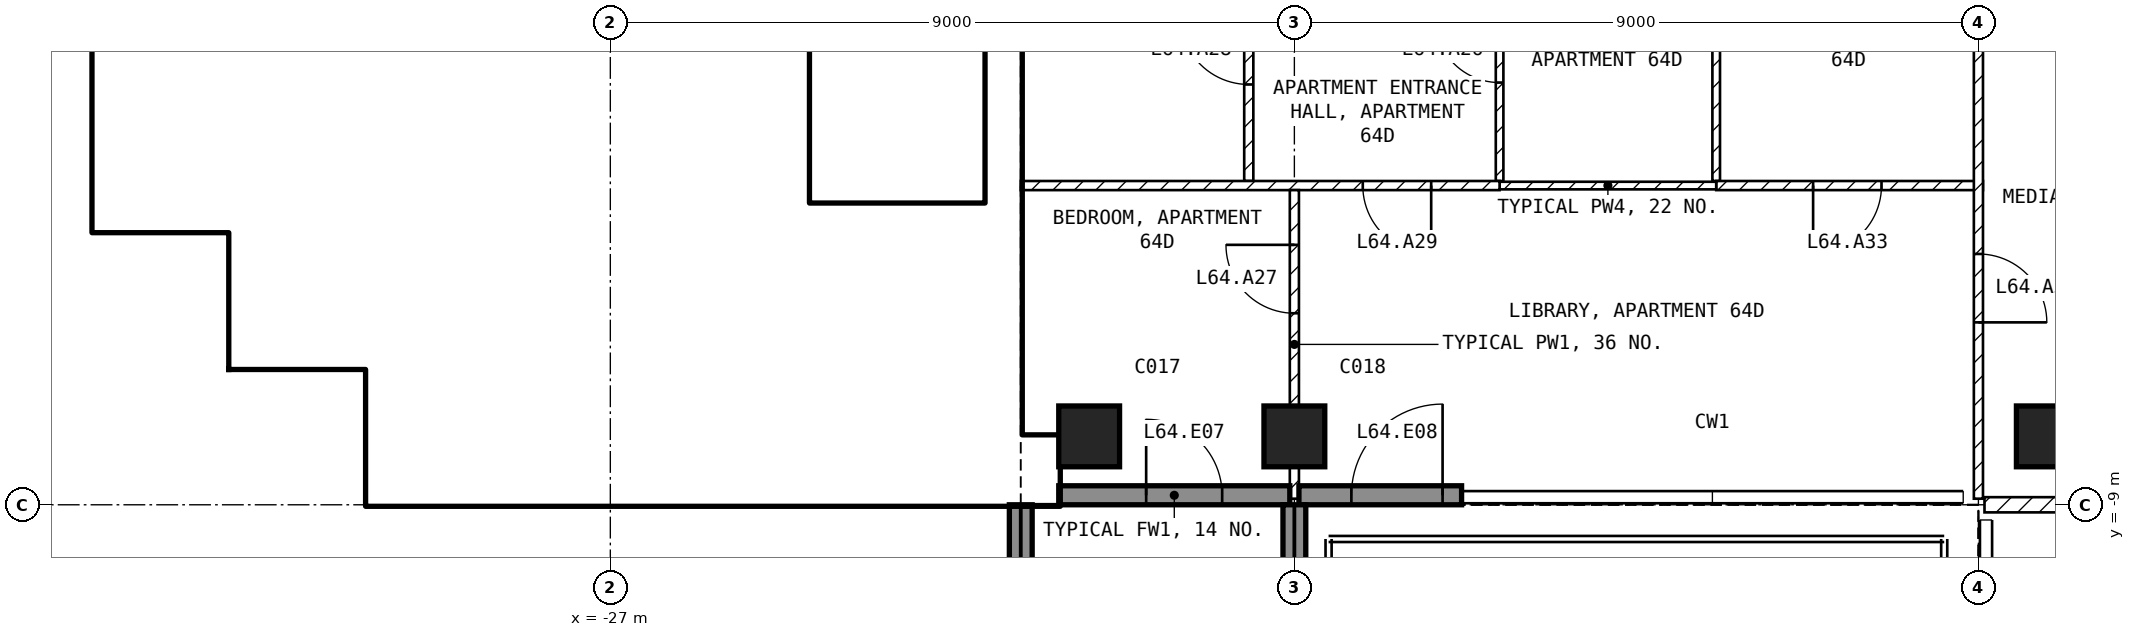
"""IFC4 building model, lengths in metres.
Left out: names, types, materials, properties, quantities, classifications, styles, units other than length and angle.
Written with IfcOpenShell. Run it as: python <this file> out.ifc"""

import sys

from ifc_helpers import new_model, si_unit, direction, frame, frame_2d, origin, origin_2d, place, context, subcontext, project, spatial, rectangle, extrude, element, fill, save


model = new_model("IFC4")
c1 = context("Model", 3, precision=1e-05, world=origin(), true_north=direction((0.0, 1.0)))
c2 = subcontext(c1, "Body", "Model", "MODEL_VIEW")
j1 = project(units=[si_unit("LENGTHUNIT", "METRE"), si_unit("PLANEANGLEUNIT", "RADIAN")], contexts=[c1])
p1 = place(None, origin())
s1 = spatial("IfcSite", under=j1, at=p1, CompositionType="ELEMENT")
p2 = place(p1, origin())
s2 = spatial("IfcBuilding", under=s1, at=p2, CompositionType="ELEMENT")
p3 = place(p2, frame((0.0, 0.0, 253.5)))
s3 = spatial("IfcBuildingStorey", under=s2, at=p3, CompositionType="ELEMENT", Elevation=253.5)
for number, where, z_axis, x_axis in (
    (1, (-20.7, -8.1, -0.25), (0.0, 0.0, 1.0), (1.0, 0.0, 0.0)),
    (2, (-18.0, -8.1, -0.25), (0.0, 0.0, 1.0), (1.0, 0.0, 0.0)),
    (3, (-8.1, -8.1, -0.25), (0.0, 0.0, 1.0), (1.0, 0.0, 0.0)),
):
    element("IfcColumn", number, at=place(p3, frame(where, z_axis=z_axis, x_axis=x_axis)), inside=s3, PredefinedType="COLUMN", context=c2, shape_type="SweptSolid", body=[
        extrude(rectangle(XDim=0.8, YDim=0.8, at=origin_2d()), origin(), (0.0, 0.0, 1.0), 3.5),
    ])
p4 = place(p3, frame((-21.1, -8.875, 0.0), z_axis=(0.0, 0.0, 1.0), x_axis=(1.0, 0.0, 0.0)))
e4 = element("IfcWall", 4, at=p4, inside=s3, PredefinedType="SOLIDWALL", context=c2, shape_type="SweptSolid", body=[
    extrude(rectangle(XDim=3.04, YDim=0.25, at=frame_2d((1.52, 0.0))), origin(), (0.0, 0.0, 1.0), 3.25),
])
p5 = place(p4, frame((1.15, 0.0, 0.0)))
e5 = element("IfcOpeningElement", 5, at=p5, cuts=e4, PredefinedType="OPENING", context=c2, shape_type="SweptSolid", body=[
    extrude(rectangle(XDim=1.0, YDim=2.4, at=frame_2d((0.5, 1.2))), frame((0.0, 0.135, 0.0), z_axis=(0.0, -1.0, 0.0), x_axis=(1.0, 0.0, 0.0)), (0.0, 0.0, 1.0), 0.27),
])
p6 = place(p3, frame((-17.94, -8.875, 0.0), z_axis=(0.0, 0.0, 1.0), x_axis=(1.0, 0.0, 0.0)))
e6 = element("IfcWall", 6, at=p6, inside=s3, PredefinedType="SOLIDWALL", context=c2, shape_type="SweptSolid", body=[
    extrude(rectangle(XDim=2.14, YDim=0.25, at=frame_2d((1.07, 0.0))), origin(), (0.0, 0.0, 1.0), 3.25),
])
p7 = place(p6, frame((0.69, 0.0, 0.0)))
e7 = element("IfcOpeningElement", 7, at=p7, cuts=e6, PredefinedType="OPENING", context=c2, shape_type="SweptSolid", body=[
    extrude(rectangle(XDim=1.2, YDim=2.4, at=frame_2d((0.6, 1.2))), frame((0.0, 0.135, 0.0), z_axis=(0.0, -1.0, 0.0), x_axis=(1.0, 0.0, 0.0)), (0.0, 0.0, 1.0), 0.27),
])
p8 = place(p3, frame((-21.6, -9.0, 0.0), z_axis=(0.0, 0.0, 1.0), x_axis=(0.0, -1.0, 0.0)))
e8 = element("IfcWall", 8, at=p8, inside=s3, PredefinedType="SOLIDWALL", context=c2, shape_type="SweptSolid", body=[
    extrude(rectangle(XDim=2.7, YDim=0.3, at=frame_2d((1.35, 0.0))), origin(), (0.0, 0.0, 1.0), 3.25),
])
p9 = place(p3, frame((-18.0, -9.0, 0.0), z_axis=(0.0, 0.0, 1.0), x_axis=(0.0, -1.0, 0.0)))
e9 = element("IfcWall", 9, at=p9, inside=s3, PredefinedType="SOLIDWALL", context=c2, shape_type="SweptSolid", body=[
    extrude(rectangle(XDim=2.74, YDim=0.3, at=frame_2d((1.37, 0.0))), origin(), (0.0, 0.0, 1.0), 3.25),
])
p10 = place(p3, frame((-30.2, -8.55, 0.0), z_axis=(0.0, 0.0, 1.0), x_axis=(1.0, 0.0, 0.0)))
e10 = element("IfcWall", 10, at=p10, inside=s3, PredefinedType="SHEAR", context=c2, shape_type="SweptSolid", body=[
    extrude(rectangle(XDim=9.1, YDim=0.9, at=frame_2d((4.55, 0.0))), origin(), (0.0, 0.0, 1.0), 3.25),
])
p11 = place(p3, frame((-29.975, -8.1, 0.0), z_axis=(0.0, 0.0, 1.0), x_axis=(0.0, 1.0, 0.0)))
e11 = element("IfcWall", 11, at=p11, inside=s3, PredefinedType="SHEAR", context=c2, shape_type="SweptSolid", body=[
    extrude(rectangle(XDim=1.35, YDim=0.45, at=frame_2d((0.675, 0.0))), origin(), (0.0, 0.0, 1.0), 3.25),
])
for number, where, z_axis, x_axis in (
    (12, (-32.0, -6.975, 0.0), (0.0, 0.0, 1.0), (1.0, 0.0, 0.0)),
    (13, (-31.775, -6.75, 0.0), (0.0, 0.0, 1.0), (0.0, 1.0, 0.0)),
    (14, (-33.8, -5.175, 0.0), (0.0, 0.0, 1.0), (1.0, 0.0, 0.0)),
):
    element("IfcWall", number, at=place(p3, frame(where, z_axis=z_axis, x_axis=x_axis)), inside=s3, PredefinedType="SHEAR", context=c2, shape_type="SweptSolid", body=[
        extrude(rectangle(XDim=1.8, YDim=0.45, at=frame_2d((0.9, 0.0))), origin(), (0.0, 0.0, 1.0), 3.25),
    ])
p12 = place(p3, frame((-33.575, -4.95, 0.0), z_axis=(0.0, 0.0, 1.0), x_axis=(0.0, 1.0, 0.0)))
e15 = element("IfcWall", 15, at=p12, inside=s3, PredefinedType="SHEAR", context=c2, shape_type="SweptSolid", body=[
    extrude(rectangle(XDim=10.35, YDim=0.45, at=frame_2d((5.175, 0.0))), origin(), (0.0, 0.0, 1.0), 3.25),
])
p13 = place(p3, frame((-21.825, -8.1, 0.0), z_axis=(0.0, 0.0, 1.0), x_axis=(0.0, 1.0, 0.0)))
e16 = element("IfcWall", 16, at=p13, inside=s3, PredefinedType="SHEAR", context=c2, shape_type="SweptSolid", body=[
    extrude(rectangle(XDim=6.9, YDim=0.45, at=frame_2d((3.45, 0.0))), origin(), (0.0, 0.0, 1.0), 3.25),
])
p14 = place(p3, frame((-24.5, -5.05, 0.0), z_axis=(0.0, 0.0, 1.0), x_axis=(0.0, 1.0, 0.0)))
e17 = element("IfcWall", 17, at=p14, inside=s3, PredefinedType="SOLIDWALL", context=c2, shape_type="SweptSolid", body=[
    extrude(rectangle(XDim=3.7, YDim=0.2, at=frame_2d((1.85, 0.0))), origin(), (0.0, 0.0, 1.0), 3.25),
])
p15 = place(p14, frame((0.1, 0.0, 0.0)))
e18 = element("IfcOpeningElement", 18, at=p15, cuts=e17, PredefinedType="OPENING", context=c2, shape_type="SweptSolid", body=[
    extrude(rectangle(XDim=0.8, YDim=2.1, at=frame_2d((0.4, 1.05))), frame((0.0, 0.11, 0.0), z_axis=(0.0, -1.0, 0.0), x_axis=(1.0, 0.0, 0.0)), (0.0, 0.0, 1.0), 0.22),
])
p16 = place(p3, frame((-28.35, -5.15, 0.0), z_axis=(0.0, 0.0, 1.0), x_axis=(1.0, 0.0, 0.0)))
e19 = element("IfcWall", 19, at=p16, inside=s3, PredefinedType="SOLIDWALL", context=c2, shape_type="SweptSolid", body=[
    extrude(rectangle(XDim=6.3, YDim=0.2, at=frame_2d((3.15, 0.0))), origin(), (0.0, 0.0, 1.0), 3.25),
])
p17 = place(p16, frame((5.1, 0.0, 0.0)))
e20 = element("IfcOpeningElement", 20, at=p17, cuts=e19, PredefinedType="OPENING", context=c2, shape_type="SweptSolid", body=[
    extrude(rectangle(XDim=1.0, YDim=2.1, at=frame_2d((0.5, 1.05))), frame((0.0, 0.11, 0.0), z_axis=(0.0, -1.0, 0.0), x_axis=(1.0, 0.0, 0.0)), (0.0, 0.0, 1.0), 0.22),
])
p18 = place(p3, frame((-28.25, -8.1, 0.0), z_axis=(0.0, 0.0, 1.0), x_axis=(0.0, 1.0, 0.0)))
e21 = element("IfcWall", 21, at=p18, inside=s3, PredefinedType="SOLIDWALL", context=c2, shape_type="SweptSolid", body=[
    extrude(rectangle(XDim=2.85, YDim=0.2, at=frame_2d((1.425, 0.0))), origin(), (0.0, 0.0, 1.0), 3.25),
])
p19 = place(p3, frame((-33.35, -3.95, 0.0), z_axis=(0.0, 0.0, 1.0), x_axis=(1.0, 0.0, 0.0)))
e22 = element("IfcWall", 22, at=p19, inside=s3, PredefinedType="SOLIDWALL", context=c2, shape_type="SweptSolid", body=[
    extrude(rectangle(XDim=8.75, YDim=0.2, at=frame_2d((4.375, 0.0))), origin(), (0.0, 0.0, 1.0), 3.25),
])
for number, where, z_axis, x_axis in (
    (23, (-26.5, -3.85, 0.0), (0.0, 0.0, 1.0), (0.0, 1.0, 0.0)),
    (24, (-28.5, -3.85, 0.0), (0.0, 0.0, 1.0), (0.0, 1.0, 0.0)),
    (25, (-30.5, -3.85, 0.0), (0.0, 0.0, 1.0), (0.0, 1.0, 0.0)),
):
    element("IfcWall", number, at=place(p3, frame(where, z_axis=z_axis, x_axis=x_axis)), inside=s3, PredefinedType="SOLIDWALL", context=c2, shape_type="SweptSolid", body=[
        extrude(rectangle(XDim=2.3, YDim=0.2, at=frame_2d((1.15, 0.0))), origin(), (0.0, 0.0, 1.0), 3.25),
    ])
p20 = place(p3, frame((8.92, -9.0, 0.0), z_axis=(0.0, 0.0, 1.0), x_axis=(-1.0, 0.0, 0.0)))
e26 = element("IfcWall", 26, at=p20, inside=s3, PredefinedType="PARTITIONING", context=c2, shape_type="SweptSolid", body=[
    extrude(rectangle(XDim=17.84, YDim=0.2, at=frame_2d((8.92, 0.0))), origin(), (0.0, 0.0, 1.0), 3.25),
])
p21 = place(p20, frame((8.42, 0.0, 0.0)))
e27 = element("IfcOpeningElement", 27, at=p21, cuts=e26, PredefinedType="OPENING", context=c2, shape_type="SweptSolid", body=[
    extrude(rectangle(XDim=1.0, YDim=2.1, at=frame_2d((0.5, 1.05))), frame((0.0, 0.11, 0.0), z_axis=(0.0, -1.0, 0.0), x_axis=(1.0, 0.0, 0.0)), (0.0, 0.0, 1.0), 0.22),
])
p22 = place(p3, frame((-12.45, -4.74, 0.0), z_axis=(0.0, 0.0, 1.0), x_axis=(0.0, 1.0, 0.0)))
e28 = element("IfcWall", 28, at=p22, inside=s3, PredefinedType="PARTITIONING", context=c2, shape_type="SweptSolid", body=[
    extrude(rectangle(XDim=3.44, YDim=0.1, at=frame_2d((1.72, 0.0))), origin(), (0.0, 0.0, 1.0), 3.25),
])
p23 = place(p3, frame((-8.94, -4.8, 0.0), z_axis=(0.0, 0.0, 1.0), x_axis=(-1.0, 0.0, 0.0)))
e29 = element("IfcWall", 29, at=p23, inside=s3, PredefinedType="PARTITIONING", context=c2, shape_type="SweptSolid", body=[
    extrude(rectangle(XDim=3.51, YDim=0.12, at=frame_2d((1.755, 0.0))), origin(), (0.0, 0.0, 1.0), 3.25),
])
p24 = place(p23, frame((1.335, 0.0, 0.0)))
e30 = element("IfcOpeningElement", 30, at=p24, cuts=e29, PredefinedType="OPENING", context=c2, shape_type="SweptSolid", body=[
    extrude(rectangle(XDim=0.9, YDim=2.1, at=frame_2d((0.45, 1.05))), frame((0.0, 0.07, 0.0), z_axis=(0.0, -1.0, 0.0), x_axis=(1.0, 0.0, 0.0)), (0.0, 0.0, 1.0), 0.14),
])
p25 = place(p3, frame((-9.0, -1.3, 0.0), z_axis=(0.0, 0.0, 1.0), x_axis=(0.0, -1.0, 0.0)))
e31 = element("IfcWall", 31, at=p25, inside=s3, PredefinedType="PARTITIONING", context=c2, shape_type="SweptSolid", body=[
    extrude(rectangle(XDim=7.62, YDim=0.12, at=frame_2d((3.81, 0.0))), origin(), (0.0, 0.0, 1.0), 3.25),
])
p26 = place(p25, frame((4.4, 0.0, 0.0)))
e32 = element("IfcOpeningElement", 32, at=p26, cuts=e31, PredefinedType="OPENING", context=c2, shape_type="SweptSolid", body=[
    extrude(rectangle(XDim=0.9, YDim=2.1, at=frame_2d((0.45, 1.05))), frame((0.0, 0.07, 0.0), z_axis=(0.0, -1.0, 0.0), x_axis=(1.0, 0.0, 0.0)), (0.0, 0.0, 1.0), 0.14),
])
p27 = place(p3, frame((-15.3, -4.74, 0.0), z_axis=(0.0, 0.0, 1.0), x_axis=(0.0, 1.0, 0.0)))
e33 = element("IfcWall", 33, at=p27, inside=s3, PredefinedType="PARTITIONING", context=c2, shape_type="SweptSolid", body=[
    extrude(rectangle(XDim=3.44, YDim=0.1, at=frame_2d((1.72, 0.0))), origin(), (0.0, 0.0, 1.0), 3.25),
])
p28 = place(p27, frame((1.295, 0.0, 0.0)))
e34 = element("IfcOpeningElement", 34, at=p28, cuts=e33, PredefinedType="OPENING", context=c2, shape_type="SweptSolid", body=[
    extrude(rectangle(XDim=0.85, YDim=2.1, at=frame_2d((0.425, 1.05))), frame((0.0, 0.06, 0.0), z_axis=(0.0, -1.0, 0.0), x_axis=(1.0, 0.0, 0.0)), (0.0, 0.0, 1.0), 0.12),
])
p29 = place(p3, frame((-12.45, -4.8, 0.0), z_axis=(0.0, 0.0, 1.0), x_axis=(-1.0, 0.0, 0.0)))
e35 = element("IfcWall", 35, at=p29, inside=s3, PredefinedType="PARTITIONING", context=c2, shape_type="SweptSolid", body=[
    extrude(rectangle(XDim=2.85, YDim=0.1, at=frame_2d((1.425, 0.0))), origin(), (0.0, 0.0, 1.0), 3.25),
])
p30 = place(p3, frame((-18.6, -4.74, 0.0), z_axis=(0.0, 0.0, 1.0), x_axis=(0.0, 1.0, 0.0)))
e36 = element("IfcWall", 36, at=p30, inside=s3, PredefinedType="PARTITIONING", context=c2, shape_type="SweptSolid", body=[
    extrude(rectangle(XDim=3.44, YDim=0.12, at=frame_2d((1.72, 0.0))), origin(), (0.0, 0.0, 1.0), 3.25),
])
p31 = place(p30, frame((1.27, 0.0, 0.0)))
e37 = element("IfcOpeningElement", 37, at=p31, cuts=e36, PredefinedType="OPENING", context=c2, shape_type="SweptSolid", body=[
    extrude(rectangle(XDim=0.9, YDim=2.1, at=frame_2d((0.45, 1.05))), frame((0.0, 0.07, 0.0), z_axis=(0.0, -1.0, 0.0), x_axis=(1.0, 0.0, 0.0)), (0.0, 0.0, 1.0), 0.14),
])
p32 = place(p3, frame((-15.3, -4.8, 0.0), z_axis=(0.0, 0.0, 1.0), x_axis=(-1.0, 0.0, 0.0)))
e38 = element("IfcWall", 38, at=p32, inside=s3, PredefinedType="PARTITIONING", context=c2, shape_type="SweptSolid", body=[
    extrude(rectangle(XDim=6.3, YDim=0.12, at=frame_2d((3.15, 0.0))), origin(), (0.0, 0.0, 1.0), 3.25),
])
p33 = place(p32, frame((0.9, 0.0, 0.0)))
e39 = element("IfcOpeningElement", 39, at=p33, cuts=e38, PredefinedType="OPENING", context=c2, shape_type="SweptSolid", body=[
    extrude(rectangle(XDim=0.9, YDim=2.1, at=frame_2d((0.45, 1.05))), frame((0.0, 0.07, 0.0), z_axis=(0.0, -1.0, 0.0), x_axis=(1.0, 0.0, 0.0)), (0.0, 0.0, 1.0), 0.14),
])
p34 = place(p3, frame((-18.0, -8.92, 0.0), z_axis=(0.0, 0.0, 1.0), x_axis=(0.0, 1.0, 0.0)))
e40 = element("IfcWall", 40, at=p34, inside=s3, PredefinedType="PARTITIONING", context=c2, shape_type="SweptSolid", body=[
    extrude(rectangle(XDim=4.06, YDim=0.12, at=frame_2d((2.03, 0.0))), origin(), (0.0, 0.0, 1.0), 2.496),
])
p35 = place(p34, frame((2.44, 0.0, 0.0)))
e41 = element("IfcOpeningElement", 41, at=p35, cuts=e40, PredefinedType="OPENING", context=c2, shape_type="SweptSolid", body=[
    extrude(rectangle(XDim=0.9, YDim=2.1, at=frame_2d((0.45, 1.05))), frame((0.0, 0.07, 0.0), z_axis=(0.0, -1.0, 0.0), x_axis=(1.0, 0.0, 0.0)), (0.0, 0.0, 1.0), 0.14),
])
p36 = place(p5, origin())
e42 = element("IfcDoor", 42, at=p36, inside=s3, OperationType="SINGLE_SWING_LEFT", PredefinedType="DOOR", context=c2, shape_type="SweptSolid", body=[
    extrude(rectangle(XDim=1.0, YDim=2.4, at=frame_2d((0.5, 1.2))), frame((0.0, 0.025, 0.0), z_axis=(0.0, -1.0, 0.0), x_axis=(1.0, 0.0, 0.0)), (0.0, 0.0, 1.0), 0.05),
])
fill(e5, e42)
p37 = place(p7, origin())
e43 = element("IfcDoor", 43, at=p37, inside=s3, OperationType="SINGLE_SWING_RIGHT", PredefinedType="DOOR", context=c2, shape_type="SweptSolid", body=[
    extrude(rectangle(XDim=1.2, YDim=2.4, at=frame_2d((0.6, 1.2))), frame((0.0, 0.025, 0.0), z_axis=(0.0, -1.0, 0.0), x_axis=(1.0, 0.0, 0.0)), (0.0, 0.0, 1.0), 0.05),
])
fill(e7, e43)
p38 = place(p17, origin())
e44 = element("IfcDoor", 44, at=p38, inside=s3, OperationType="SINGLE_SWING_LEFT", PredefinedType="DOOR", context=c2, shape_type="SweptSolid", body=[
    extrude(rectangle(XDim=1.0, YDim=2.1, at=frame_2d((0.5, 1.05))), frame((0.0, 0.025, 0.0), z_axis=(0.0, -1.0, 0.0), x_axis=(1.0, 0.0, 0.0)), (0.0, 0.0, 1.0), 0.05),
])
fill(e20, e44)
p39 = place(p15, origin())
e45 = element("IfcDoor", 45, at=p39, inside=s3, OperationType="SINGLE_SWING_LEFT", PredefinedType="DOOR", context=c2, shape_type="SweptSolid", body=[
    extrude(rectangle(XDim=0.8, YDim=2.1, at=frame_2d((0.4, 1.05))), frame((0.0, 0.025, 0.0), z_axis=(0.0, -1.0, 0.0), x_axis=(1.0, 0.0, 0.0)), (0.0, 0.0, 1.0), 0.05),
])
fill(e18, e45)
p40 = place(p28, origin())
e46 = element("IfcDoor", 46, at=p40, inside=s3, OperationType="SINGLE_SWING_RIGHT", PredefinedType="DOOR", context=c2, shape_type="SweptSolid", body=[
    extrude(rectangle(XDim=0.85, YDim=2.1, at=frame_2d((0.425, 1.05))), frame((0.0, 0.025, 0.0), z_axis=(0.0, -1.0, 0.0), x_axis=(1.0, 0.0, 0.0)), (0.0, 0.0, 1.0), 0.05),
])
fill(e34, e46)
p41 = place(p35, origin())
e47 = element("IfcDoor", 47, at=p41, inside=s3, OperationType="SINGLE_SWING_RIGHT", PredefinedType="DOOR", context=c2, shape_type="SweptSolid", body=[
    extrude(rectangle(XDim=0.9, YDim=2.1, at=frame_2d((0.45, 1.05))), frame((0.0, 0.025, 0.0), z_axis=(0.0, -1.0, 0.0), x_axis=(1.0, 0.0, 0.0)), (0.0, 0.0, 1.0), 0.05),
])
fill(e41, e47)
p42 = place(p31, origin())
e48 = element("IfcDoor", 48, at=p42, inside=s3, OperationType="SINGLE_SWING_RIGHT", PredefinedType="DOOR", context=c2, shape_type="SweptSolid", body=[
    extrude(rectangle(XDim=0.9, YDim=2.1, at=frame_2d((0.45, 1.05))), frame((0.0, 0.025, 0.0), z_axis=(0.0, -1.0, 0.0), x_axis=(1.0, 0.0, 0.0)), (0.0, 0.0, 1.0), 0.05),
])
fill(e37, e48)
p43 = place(p33, origin())
e49 = element("IfcDoor", 49, at=p43, inside=s3, OperationType="SINGLE_SWING_LEFT", PredefinedType="DOOR", context=c2, shape_type="SweptSolid", body=[
    extrude(rectangle(XDim=0.9, YDim=2.1, at=frame_2d((0.45, 1.05))), frame((0.0, 0.025, 0.0), z_axis=(0.0, -1.0, 0.0), x_axis=(1.0, 0.0, 0.0)), (0.0, 0.0, 1.0), 0.05),
])
fill(e39, e49)
p44 = place(p26, origin())
e50 = element("IfcDoor", 50, at=p44, inside=s3, OperationType="SINGLE_SWING_RIGHT", PredefinedType="DOOR", context=c2, shape_type="SweptSolid", body=[
    extrude(rectangle(XDim=0.9, YDim=2.1, at=frame_2d((0.45, 1.05))), frame((0.0, 0.025, 0.0), z_axis=(0.0, -1.0, 0.0), x_axis=(1.0, 0.0, 0.0)), (0.0, 0.0, 1.0), 0.05),
])
fill(e32, e50)
p45 = place(p24, origin())
e51 = element("IfcDoor", 51, at=p45, inside=s3, OperationType="SINGLE_SWING_RIGHT", PredefinedType="DOOR", context=c2, shape_type="SweptSolid", body=[
    extrude(rectangle(XDim=0.9, YDim=2.1, at=frame_2d((0.45, 1.05))), frame((0.0, 0.025, 0.0), z_axis=(0.0, -1.0, 0.0), x_axis=(1.0, 0.0, 0.0)), (0.0, 0.0, 1.0), 0.05),
])
fill(e30, e51)
save(model, sys.argv[1])
